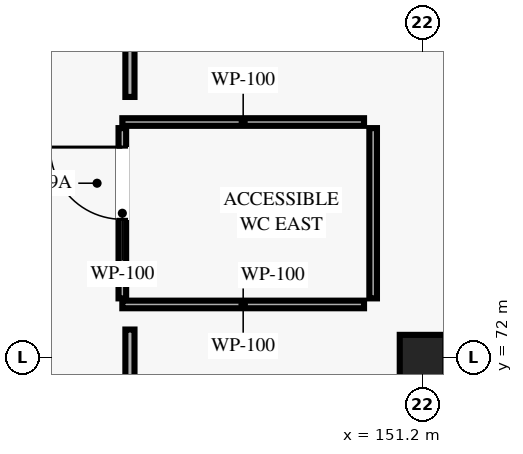
"""IFC4 building model, lengths in metres.
Left out: names, types, materials, properties, quantities, classifications, styles, units other than length and angle.
Written with IfcOpenShell. Run it as: python <this file> out.ifc"""

import sys

from ifc_helpers import new_model, si_unit, direction, frame, frame_2d, origin, origin_2d, place, context, subcontext, project, spatial, rectangle, extrude, element, fill, save


model = new_model("IFC4")
c1 = context("Model", 3, precision=1e-05, world=origin(), true_north=direction((0.0, 1.0)))
c2 = subcontext(c1, "Body", "Model", "MODEL_VIEW")
j1 = project(units=[si_unit("LENGTHUNIT", "METRE"), si_unit("PLANEANGLEUNIT", "RADIAN")], contexts=[c1])
p1 = place(None, origin())
s1 = spatial("IfcSite", under=j1, at=p1, CompositionType="ELEMENT")
p2 = place(p1, origin())
s2 = spatial("IfcBuilding", under=s1, at=p2, CompositionType="ELEMENT")
p3 = place(p2, frame((0.0, 0.0, 21.6)))
s3 = spatial("IfcBuildingStorey", under=s2, at=p3, CompositionType="ELEMENT", Elevation=21.6)
p4 = place(p3, frame((151.2, 72.0, 0.0), z_axis=(0.0, 0.0, 1.0), x_axis=(1.0, 0.0, 0.0)))
e1 = element("IfcColumn", 1, at=p4, inside=s3, PredefinedType="COLUMN", context=c2, shape_type="SweptSolid", body=[
    extrude(rectangle(XDim=0.6, YDim=0.6, at=origin_2d()), origin(), (0.0, 0.0, 1.0), 4.05),
])
p5 = place(p3, frame((147.25, 72.78, 0.0), z_axis=(0.0, 0.0, 1.0), x_axis=(0.0, 1.0, 0.0)))
e2 = element("IfcWall", 2, at=p5, inside=s3, PredefinedType="PARTITIONING", context=c2, shape_type="SweptSolid", body=[
    extrude(rectangle(XDim=2.24, YDim=0.1, at=frame_2d((1.12, 0.0))), origin(), (0.0, 0.0, 1.0), 3.83),
])
p6 = place(p5, frame((1.04, 0.0, 0.0)))
e3 = element("IfcOpeningElement", 3, at=p6, cuts=e2, PredefinedType="OPENING", context=c2, shape_type="SweptSolid", body=[
    extrude(rectangle(XDim=0.95, YDim=2.1, at=frame_2d((0.475, 1.05))), frame((0.0, 0.06, 0.0), z_axis=(0.0, -1.0, 0.0), x_axis=(1.0, 0.0, 0.0)), (0.0, 0.0, 1.0), 0.12),
])
for number, where, z_axis, x_axis in (
    (4, (147.25, 72.7, 0.0), (0.0, 0.0, 1.0), (1.0, 0.0, 0.0)),
    (5, (147.25, 75.1, 0.0), (0.0, 0.0, 1.0), (1.0, 0.0, 0.0)),
):
    element("IfcWall", number, at=place(p3, frame(where, z_axis=z_axis, x_axis=x_axis)), inside=s3, PredefinedType="PARTITIONING", context=c2, shape_type="SweptSolid", body=[
        extrude(rectangle(XDim=3.18, YDim=0.1, at=frame_2d((1.59, 0.0))), origin(), (0.0, 0.0, 1.0), 3.83),
    ])
p7 = place(p3, frame((150.55, 72.78, 0.0), z_axis=(0.0, 0.0, 1.0), x_axis=(0.0, 1.0, 0.0)))
e6 = element("IfcWall", 6, at=p7, inside=s3, PredefinedType="PARTITIONING", context=c2, shape_type="SweptSolid", body=[
    extrude(rectangle(XDim=2.24, YDim=0.1, at=frame_2d((1.12, 0.0))), origin(), (0.0, 0.0, 1.0), 3.83),
])
p8 = place(p3, frame((147.35, 75.43, 0.0), z_axis=(0.0, 0.0, 1.0), x_axis=(0.0, 1.0, 0.0)))
e7 = element("IfcWall", 7, at=p8, inside=s3, PredefinedType="PARTITIONING", context=c2, shape_type="SweptSolid", body=[
    extrude(rectangle(XDim=16.87, YDim=0.12, at=frame_2d((8.435, 0.0))), origin(), (0.0, 0.0, 1.0), 3.83),
])
p9 = place(p8, frame((6.573, 0.0, 0.0)))
e8 = element("IfcOpeningElement", 8, at=p9, cuts=e7, PredefinedType="OPENING", context=c2, shape_type="SweptSolid", body=[
    extrude(rectangle(XDim=1.7, YDim=2.2, at=frame_2d((0.85, 1.1))), frame((0.0, 0.07, 0.0), z_axis=(0.0, -1.0, 0.0), x_axis=(1.0, 0.0, 0.0)), (0.0, 0.0, 1.0), 0.14),
])
p10 = place(p3, frame((147.35, 57.15, 0.0), z_axis=(0.0, 0.0, 1.0), x_axis=(0.0, 1.0, 0.0)))
e9 = element("IfcWall", 9, at=p10, inside=s3, PredefinedType="PARTITIONING", context=c2, shape_type="SweptSolid", body=[
    extrude(rectangle(XDim=15.22, YDim=0.12, at=frame_2d((7.61, 0.0))), origin(), (0.0, 0.0, 1.0), 3.83),
])
p11 = place(p6, origin())
e10 = element("IfcDoor", 10, at=p11, inside=s3, OperationType="SINGLE_SWING_RIGHT", PredefinedType="DOOR", context=c2, shape_type="SweptSolid", body=[
    extrude(rectangle(XDim=0.95, YDim=2.1, at=frame_2d((0.475, 1.05))), frame((0.0, 0.025, 0.0), z_axis=(0.0, -1.0, 0.0), x_axis=(1.0, 0.0, 0.0)), (0.0, 0.0, 1.0), 0.05),
])
fill(e3, e10)
save(model, sys.argv[1])
